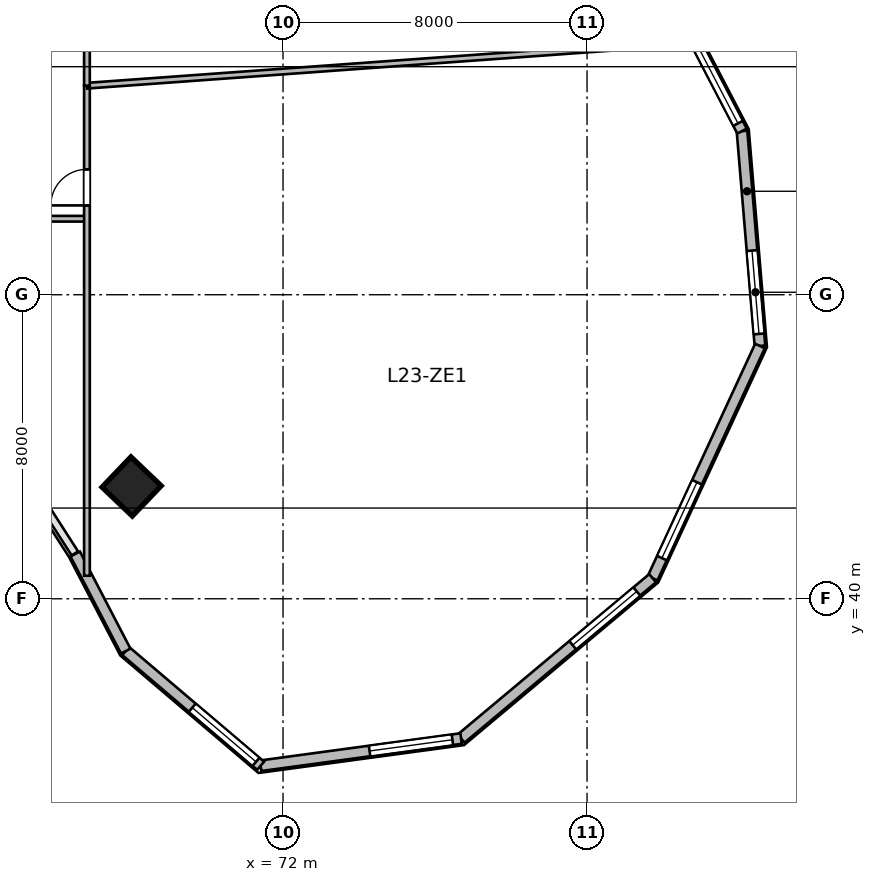
"""IFC4 building model, lengths in metres.
Left out: names, types, materials, properties, quantities, classifications, styles, units other than length and angle.
Written with IfcOpenShell. Run it as: python <this file> out.ifc"""

import sys

from ifc_helpers import new_model, si_unit, direction, frame, frame_2d, origin, origin_2d, place, context, subcontext, project, spatial, rectangle, extrude, source, transform, mapped, element, fill, save


model = new_model("IFC4")
c1 = context("Model", 3, precision=1e-05, world=origin(), true_north=direction((0.0, 1.0)))
c2 = subcontext(c1, "Body", "Model", "MODEL_VIEW")
j1 = project(units=[si_unit("LENGTHUNIT", "METRE"), si_unit("PLANEANGLEUNIT", "RADIAN")], contexts=[c1])
p1 = place(None, origin())
s1 = spatial("IfcSite", under=j1, at=p1, CompositionType="ELEMENT")
p2 = place(p1, origin())
s2 = spatial("IfcBuilding", under=s1, at=p2, CompositionType="ELEMENT")
p3 = place(p2, frame((0.0, 0.0, 99.9)))
s3 = spatial("IfcBuildingStorey", under=s2, at=p3, CompositionType="ELEMENT", Elevation=99.9)
m1 = source(origin(), c2, "Body", "SweptSolid", [
    extrude(rectangle(XDim=1.1, YDim=1.1, at=origin_2d()), origin(), (0.0, 0.0, 1.0), 3.9),
])
p4 = place(p3, frame((68.015, 42.955, 0.0), z_axis=(0.0, 0.0, 1.0), x_axis=(0.690756218984, 0.723087716626, 0.0)))
e1 = element("IfcColumn", 1, at=p4, inside=s3, PredefinedType="COLUMN", context=c2, shape_type="MappedRepresentation", body=[
    mapped(m1, transform((0.0, 0.0, 0.0), scale=1.0)),
])
m2 = source(origin(), c2, "Body", "SweptSolid", [
    extrude(rectangle(XDim=5.674, YDim=0.28, at=frame_2d((2.837, 0.0))), origin(), (0.0, 0.0, 1.0), 3.65),
])
p5 = place(p3, frame((84.078, 52.305, 0.0), z_axis=(0.0, 0.0, 1.0), x_axis=(0.083309007867, -0.996523762491, 0.0)))
e2 = element("IfcWall", 2, at=p5, inside=s3, PredefinedType="SOLIDWALL", context=c2, shape_type="MappedRepresentation", body=[
    mapped(m2, transform((0.0, 0.0, 0.0), scale=1.0)),
])
p6 = place(p5, frame((3.155, 0.0, 0.95)))
e3 = element("IfcOpeningElement", 3, at=p6, cuts=e2, PredefinedType="OPENING", context=c2, shape_type="SweptSolid", body=[
    extrude(rectangle(XDim=2.2, YDim=2.1, at=frame_2d((1.1, 1.05))), frame((0.0, 0.15, 0.0), z_axis=(0.0, -1.0, 0.0), x_axis=(1.0, 0.0, 0.0)), (0.0, 0.0, 1.0), 0.3),
])
m3 = source(origin(), c2, "Body", "SweptSolid", [
    extrude(rectangle(XDim=6.732, YDim=0.28, at=frame_2d((3.366, 0.0))), origin(), (0.0, 0.0, 1.0), 3.65),
])
p7 = place(p3, frame((84.55, 46.652, 0.0), z_axis=(0.0, 0.0, 1.0), x_axis=(-0.419644552709, -0.907688520023, 0.0)))
e4 = element("IfcWall", 4, at=p7, inside=s3, PredefinedType="SOLIDWALL", context=c2, shape_type="MappedRepresentation", body=[
    mapped(m3, transform((0.0, 0.0, 0.0), scale=1.0)),
])
p8 = place(p7, frame((3.949, 0.0, 0.95)))
e5 = element("IfcOpeningElement", 5, at=p8, cuts=e4, PredefinedType="OPENING", context=c2, shape_type="SweptSolid", body=[
    extrude(rectangle(XDim=2.2, YDim=2.1, at=frame_2d((1.1, 1.05))), frame((0.0, 0.15, 0.0), z_axis=(0.0, -1.0, 0.0), x_axis=(1.0, 0.0, 0.0)), (0.0, 0.0, 1.0), 0.3),
])
m4 = source(origin(), c2, "Body", "SweptSolid", [
    extrude(rectangle(XDim=6.573, YDim=0.28, at=frame_2d((3.287, 0.0))), origin(), (0.0, 0.0, 1.0), 3.65),
])
p9 = place(p3, frame((81.725, 40.541, 0.0), z_axis=(0.0, 0.0, 1.0), x_axis=(-0.766715154163, -0.641987439423, 0.0)))
e6 = element("IfcWall", 6, at=p9, inside=s3, PredefinedType="SOLIDWALL", context=c2, shape_type="MappedRepresentation", body=[
    mapped(m4, transform((0.0, 0.0, 0.0), scale=1.0)),
])
p10 = place(p9, frame((0.543, 0.0, 0.95)))
e7 = element("IfcOpeningElement", 7, at=p10, cuts=e6, PredefinedType="OPENING", context=c2, shape_type="SweptSolid", body=[
    extrude(rectangle(XDim=2.2, YDim=2.1, at=frame_2d((1.1, 1.05))), frame((0.0, 0.15, 0.0), z_axis=(0.0, -1.0, 0.0), x_axis=(1.0, 0.0, 0.0)), (0.0, 0.0, 1.0), 0.3),
])
m5 = source(origin(), c2, "Body", "SweptSolid", [
    extrude(rectangle(XDim=5.324, YDim=0.28, at=frame_2d((2.662, 0.0))), origin(), (0.0, 0.0, 1.0), 3.65),
])
p11 = place(p3, frame((76.686, 36.322, 0.0), z_axis=(0.0, 0.0, 1.0), x_axis=(-0.990931467223, -0.134368252451, 0.0)))
e8 = element("IfcWall", 8, at=p11, inside=s3, PredefinedType="SOLIDWALL", context=c2, shape_type="MappedRepresentation", body=[
    mapped(m5, transform((0.0, 0.0, 0.0), scale=1.0)),
])
p12 = place(p11, frame((0.231, 0.0, 0.95)))
e9 = element("IfcOpeningElement", 9, at=p12, cuts=e8, PredefinedType="OPENING", context=c2, shape_type="SweptSolid", body=[
    extrude(rectangle(XDim=2.2, YDim=2.1, at=frame_2d((1.1, 1.05))), frame((0.0, 0.15, 0.0), z_axis=(0.0, -1.0, 0.0), x_axis=(1.0, 0.0, 0.0)), (0.0, 0.0, 1.0), 0.3),
])
m6 = source(origin(), c2, "Body", "SweptSolid", [
    extrude(rectangle(XDim=4.659, YDim=0.28, at=frame_2d((2.33, 0.0))), origin(), (0.0, 0.0, 1.0), 3.65),
])
p13 = place(p3, frame((71.41, 35.606, 0.0), z_axis=(0.0, 0.0, 1.0), x_axis=(-0.761913458795, 0.647678841176, 0.0)))
e10 = element("IfcWall", 10, at=p13, inside=s3, PredefinedType="SOLIDWALL", context=c2, shape_type="MappedRepresentation", body=[
    mapped(m6, transform((0.0, 0.0, 0.0), scale=1.0)),
])
p14 = place(p13, frame((0.16, 0.0, 0.95)))
e11 = element("IfcOpeningElement", 11, at=p14, cuts=e10, PredefinedType="OPENING", context=c2, shape_type="SweptSolid", body=[
    extrude(rectangle(XDim=2.2, YDim=2.1, at=frame_2d((1.1, 1.05))), frame((0.0, 0.15, 0.0), z_axis=(0.0, -1.0, 0.0), x_axis=(1.0, 0.0, 0.0)), (0.0, 0.0, 1.0), 0.3),
])
m7 = source(origin(), c2, "Body", "SweptSolid", [
    extrude(rectangle(XDim=2.88, YDim=0.28, at=frame_2d((1.44, 0.0))), origin(), (0.0, 0.0, 1.0), 3.65),
])
p15 = place(p3, frame((67.861, 38.624, 0.0), z_axis=(0.0, 0.0, 1.0), x_axis=(-0.461769086658, 0.887000175088, 0.0)))
e12 = element("IfcWall", 12, at=p15, inside=s3, PredefinedType="SOLIDWALL", context=c2, shape_type="MappedRepresentation", body=[
    mapped(m7, transform((0.0, 0.0, 0.0), scale=1.0)),
])
m8 = source(origin(), c2, "Body", "SweptSolid", [
    extrude(rectangle(XDim=5.315, YDim=0.28, at=frame_2d((2.658, 0.0))), origin(), (0.0, 0.0, 1.0), 3.65),
])
p16 = place(p3, frame((81.623, 57.02, 0.0), z_axis=(0.0, 0.0, 1.0), x_axis=(0.461760527822, -0.887004630735, 0.0)))
e13 = element("IfcWall", 13, at=p16, inside=s3, PredefinedType="SOLIDWALL", context=c2, shape_type="MappedRepresentation", body=[
    mapped(m8, transform((0.0, 0.0, 0.0), scale=1.0)),
])
p17 = place(p16, frame((2.886, 0.0, 0.95)))
e14 = element("IfcOpeningElement", 14, at=p17, cuts=e13, PredefinedType="OPENING", context=c2, shape_type="SweptSolid", body=[
    extrude(rectangle(XDim=2.2, YDim=2.1, at=frame_2d((1.1, 1.05))), frame((0.0, 0.15, 0.0), z_axis=(0.0, -1.0, 0.0), x_axis=(1.0, 0.0, 0.0)), (0.0, 0.0, 1.0), 0.3),
])
m9 = source(origin(), c2, "Body", "SweptSolid", [
    extrude(rectangle(XDim=2.5, YDim=0.15, at=frame_2d((1.25, 0.0))), origin(), (0.0, 0.0, 1.0), 3.65),
])
p18 = place(p3, frame((64.3, 50.0, 0.0), z_axis=(0.0, 0.0, 1.0), x_axis=(1.0, 0.0, 0.0)))
e15 = element("IfcWall", 15, at=p18, inside=s3, PredefinedType="PARTITIONING", context=c2, shape_type="MappedRepresentation", body=[
    mapped(m9, transform((0.0, 0.0, 0.0), scale=1.0)),
])
m10 = source(origin(), c2, "Body", "SweptSolid", [
    extrude(rectangle(XDim=12.894, YDim=0.15, at=frame_2d((6.447, 0.0))), origin(), (0.0, 0.0, 1.0), 2.942),
])
p19 = place(p3, frame((66.84, 40.606, 0.0), z_axis=(0.0, 0.0, 1.0), x_axis=(0.0, 1.0, 0.0)))
e16 = element("IfcWall", 16, at=p19, inside=s3, PredefinedType="PARTITIONING", context=c2, shape_type="MappedRepresentation", body=[
    mapped(m10, transform((0.0, 0.0, 0.0), scale=1.0)),
])
p20 = place(p19, frame((9.744, 0.0, 0.0)))
e17 = element("IfcOpeningElement", 17, at=p20, cuts=e16, PredefinedType="OPENING", context=c2, shape_type="SweptSolid", body=[
    extrude(rectangle(XDim=0.95, YDim=2.1, at=frame_2d((0.475, 1.05))), frame((0.0, 0.085, 0.0), z_axis=(0.0, -1.0, 0.0), x_axis=(1.0, 0.0, 0.0)), (0.0, 0.0, 1.0), 0.17),
])
m11 = source(origin(), c2, "Body", "SweptSolid", [
    extrude(rectangle(XDim=15.924, YDim=0.15, at=frame_2d((7.962, 0.0))), origin(), (0.0, 0.0, 1.0), 3.65),
])
p21 = place(p3, frame((66.84, 53.5, 0.0), z_axis=(0.0, 0.0, 1.0), x_axis=(0.997397082693, 0.072104503572, 0.0)))
e18 = element("IfcWall", 18, at=p21, inside=s3, PredefinedType="PARTITIONING", context=c2, shape_type="MappedRepresentation", body=[
    mapped(m11, transform((0.0, 0.0, 0.0), scale=1.0)),
])
m12 = source(origin(), c2, "Body", "SweptSolid", [
    extrude(rectangle(XDim=5.5, YDim=0.15, at=frame_2d((2.75, 0.0))), origin(), (0.0, 0.0, 1.0), 3.022),
])
p22 = place(p3, frame((66.84, 53.5, 0.0), z_axis=(0.0, 0.0, 1.0), x_axis=(0.0, 1.0, 0.0)))
e19 = element("IfcWall", 19, at=p22, inside=s3, PredefinedType="PARTITIONING", context=c2, shape_type="MappedRepresentation", body=[
    mapped(m12, transform((0.0, 0.0, 0.0), scale=1.0)),
])
p23 = place(p22, frame((2.275, 0.0, 0.0)))
e20 = element("IfcOpeningElement", 20, at=p23, cuts=e19, PredefinedType="OPENING", context=c2, shape_type="SweptSolid", body=[
    extrude(rectangle(XDim=0.95, YDim=2.1, at=frame_2d((0.475, 1.05))), frame((0.0, 0.085, 0.0), z_axis=(0.0, -1.0, 0.0), x_axis=(1.0, 0.0, 0.0)), (0.0, 0.0, 1.0), 0.17),
])
m13 = source(origin(), c2, "Body", "SweptSolid", [
    extrude(rectangle(XDim=2.2, YDim=2.1, at=frame_2d((1.1, 1.05))), frame((0.0, 0.03, 0.0), z_axis=(0.0, -1.0, 0.0), x_axis=(1.0, 0.0, 0.0)), (0.0, 0.0, 1.0), 0.06),
])
p24 = place(p6, origin())
e21 = element("IfcWindow", 21, at=p24, inside=s3, PartitioningType="TRIPLE_PANEL_VERTICAL", PredefinedType="WINDOW", context=c2, shape_type="MappedRepresentation", body=[
    mapped(m13, transform((0.0, 0.0, 0.0), scale=1.0)),
])
fill(e3, e21)
p25 = place(p8, origin())
e22 = element("IfcWindow", 22, at=p25, inside=s3, PartitioningType="TRIPLE_PANEL_VERTICAL", PredefinedType="WINDOW", context=c2, shape_type="MappedRepresentation", body=[
    mapped(m13, transform((0.0, 0.0, 0.0), scale=1.0)),
])
fill(e5, e22)
p26 = place(p10, origin())
e23 = element("IfcWindow", 23, at=p26, inside=s3, PartitioningType="TRIPLE_PANEL_VERTICAL", PredefinedType="WINDOW", context=c2, shape_type="MappedRepresentation", body=[
    mapped(m13, transform((0.0, 0.0, 0.0), scale=1.0)),
])
fill(e7, e23)
p27 = place(p12, origin())
e24 = element("IfcWindow", 24, at=p27, inside=s3, PartitioningType="TRIPLE_PANEL_VERTICAL", PredefinedType="WINDOW", context=c2, shape_type="MappedRepresentation", body=[
    mapped(m13, transform((0.0, 0.0, 0.0), scale=1.0)),
])
fill(e9, e24)
p28 = place(p14, origin())
e25 = element("IfcWindow", 25, at=p28, inside=s3, PartitioningType="TRIPLE_PANEL_VERTICAL", PredefinedType="WINDOW", context=c2, shape_type="MappedRepresentation", body=[
    mapped(m13, transform((0.0, 0.0, 0.0), scale=1.0)),
])
fill(e11, e25)
p29 = place(p17, origin())
e26 = element("IfcWindow", 26, at=p29, inside=s3, PartitioningType="TRIPLE_PANEL_VERTICAL", PredefinedType="WINDOW", context=c2, shape_type="MappedRepresentation", body=[
    mapped(m13, transform((0.0, 0.0, 0.0), scale=1.0)),
])
fill(e14, e26)
m14 = source(origin(), c2, "Body", "SweptSolid", [
    extrude(rectangle(XDim=0.95, YDim=2.1, at=frame_2d((0.475, 1.05))), frame((0.0, 0.025, 0.0), z_axis=(0.0, -1.0, 0.0), x_axis=(1.0, 0.0, 0.0)), (0.0, 0.0, 1.0), 0.05),
])
p30 = place(p20, origin())
e27 = element("IfcDoor", 27, at=p30, inside=s3, OperationType="SINGLE_SWING_LEFT", PredefinedType="DOOR", context=c2, shape_type="MappedRepresentation", body=[
    mapped(m14, transform((0.0, 0.0, 0.0), scale=1.0)),
])
fill(e17, e27)
save(model, sys.argv[1])
